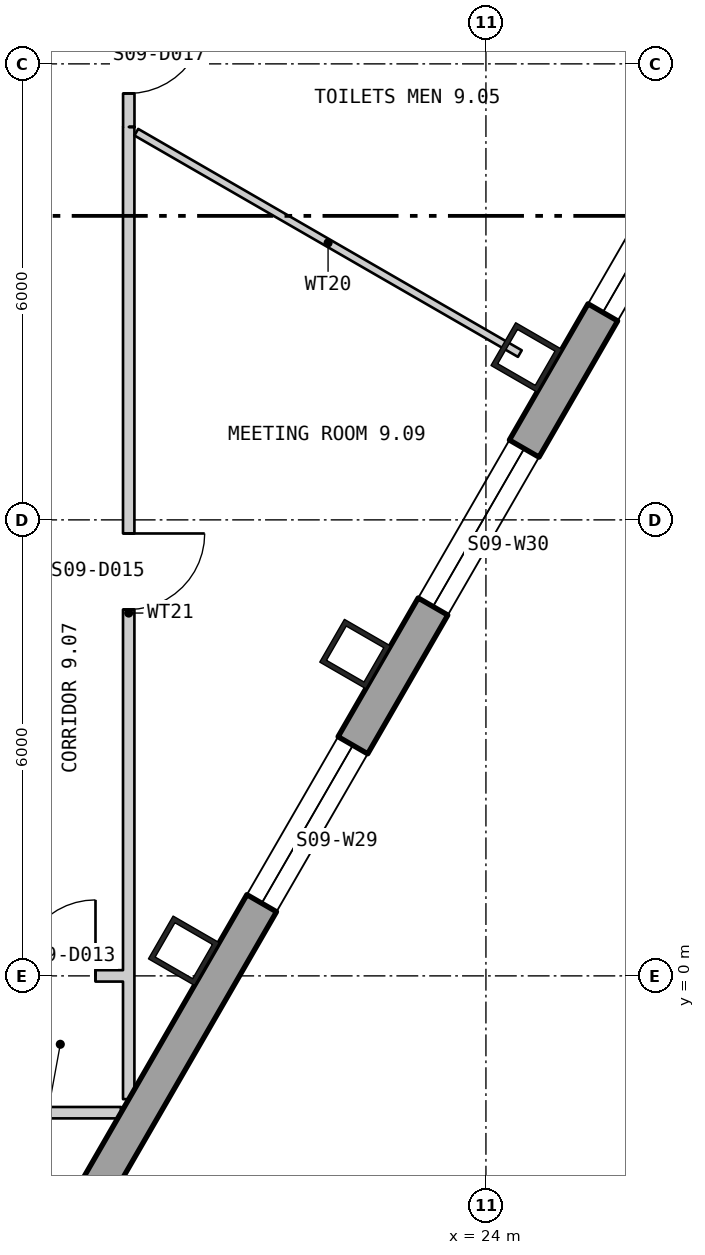
"""IFC4 building model, lengths in metres.
Left out: names, types, materials, properties, quantities, classifications, styles, units other than length and angle.
Written with IfcOpenShell. Run it as: python <this file> out.ifc"""

import sys

from ifc_helpers import new_model, si_unit, direction, frame, frame_2d, origin, origin_2d, place, context, subcontext, project, spatial, polyline, rectangle, hollow_rectangle, outline, extrude, element, fill, save


model = new_model("IFC4")
c1 = context("Model", 3, precision=1e-05, world=origin(), true_north=direction((0.0, 1.0)))
c2 = subcontext(c1, "Body", "Model", "MODEL_VIEW")
j1 = project(units=[si_unit("LENGTHUNIT", "METRE"), si_unit("PLANEANGLEUNIT", "RADIAN")], contexts=[c1])
p1 = place(None, origin())
s1 = spatial("IfcSite", under=j1, at=p1, CompositionType="ELEMENT")
p2 = place(p1, origin())
s2 = spatial("IfcBuilding", under=s1, at=p2, CompositionType="ELEMENT")
p3 = place(p2, frame((0.0, 0.0, 124.8)))
s3 = spatial("IfcBuildingStorey", under=s2, at=p3, CompositionType="ELEMENT", Elevation=124.8)
for number, where, z_axis, x_axis in (
    (1, (20.025, 0.331, 0.0), (0.0, 0.0, 1.0), (0.5, 0.866, 0.0)),
    (2, (22.279, 4.235, 0.0), (0.0, 0.0, 1.0), (0.5, 0.866, 0.0)),
    (3, (24.532, 8.138, 0.0), (0.0, 0.0, 1.0), (0.5, 0.866, 0.0)),
):
    element("IfcColumn", number, at=place(p3, frame(where, z_axis=z_axis, x_axis=x_axis)), inside=s3, PredefinedType="COLUMN", context=c2, shape_type="SweptSolid", body=[
        extrude(hollow_rectangle(XDim=0.65, YDim=0.7, WallThickness=0.065, at=origin_2d()), origin(), (0.0, 0.0, 1.0), 4.5),
    ])
p4 = place(p3, frame((4.58, -27.57, -0.18), z_axis=(0.0, 0.0, 1.0), x_axis=(0.500000711659, 0.866024992908, 0.0)))
e4 = element("IfcWall", 4, at=p4, inside=s3, PredefinedType="SOLIDWALL", context=c2, shape_type="SweptSolid", body=[
    extrude(outline(polyline([(-0.13, -0.225), (45.87, -0.225), (45.61, 0.225), (0.13, 0.225), (-0.13, -0.225)])), origin(), (0.0, 0.0, 1.0), 4.28),
])
p5 = place(p4, frame((1.424, 0.0, 1.08)))
e5 = element("IfcOpeningElement", 5, at=p5, cuts=e4, PredefinedType="OPENING", context=c2, shape_type="SweptSolid", body=[
    extrude(rectangle(XDim=2.4, YDim=2.6, at=frame_2d((1.2, 1.3))), frame((0.0, 0.235, 0.0), z_axis=(0.0, -1.0, 0.0), x_axis=(1.0, 0.0, 0.0)), (0.0, 0.0, 1.0), 0.47),
])
p6 = place(p4, frame((5.893, 0.0, 1.08)))
e6 = element("IfcOpeningElement", 6, at=p6, cuts=e4, PredefinedType="OPENING", context=c2, shape_type="SweptSolid", body=[
    extrude(rectangle(XDim=2.4, YDim=2.6, at=frame_2d((1.2, 1.3))), frame((0.0, 0.235, 0.0), z_axis=(0.0, -1.0, 0.0), x_axis=(1.0, 0.0, 0.0)), (0.0, 0.0, 1.0), 0.47),
])
p7 = place(p4, frame((10.401, 0.0, 1.08)))
e7 = element("IfcOpeningElement", 7, at=p7, cuts=e4, PredefinedType="OPENING", context=c2, shape_type="SweptSolid", body=[
    extrude(rectangle(XDim=2.4, YDim=2.6, at=frame_2d((1.2, 1.3))), frame((0.0, 0.235, 0.0), z_axis=(0.0, -1.0, 0.0), x_axis=(1.0, 0.0, 0.0)), (0.0, 0.0, 1.0), 0.47),
])
p8 = place(p4, frame((14.909, 0.0, 1.08)))
e8 = element("IfcOpeningElement", 8, at=p8, cuts=e4, PredefinedType="OPENING", context=c2, shape_type="SweptSolid", body=[
    extrude(rectangle(XDim=2.4, YDim=2.6, at=frame_2d((1.2, 1.3))), frame((0.0, 0.235, 0.0), z_axis=(0.0, -1.0, 0.0), x_axis=(1.0, 0.0, 0.0)), (0.0, 0.0, 1.0), 0.47),
])
p9 = place(p4, frame((19.416, 0.0, 1.08)))
e9 = element("IfcOpeningElement", 9, at=p9, cuts=e4, PredefinedType="OPENING", context=c2, shape_type="SweptSolid", body=[
    extrude(rectangle(XDim=2.4, YDim=2.6, at=frame_2d((1.2, 1.3))), frame((0.0, 0.235, 0.0), z_axis=(0.0, -1.0, 0.0), x_axis=(1.0, 0.0, 0.0)), (0.0, 0.0, 1.0), 0.47),
])
p10 = place(p4, frame((23.924, 0.0, 1.08)))
e10 = element("IfcOpeningElement", 10, at=p10, cuts=e4, PredefinedType="OPENING", context=c2, shape_type="SweptSolid", body=[
    extrude(rectangle(XDim=2.4, YDim=2.6, at=frame_2d((1.2, 1.3))), frame((0.0, 0.235, 0.0), z_axis=(0.0, -1.0, 0.0), x_axis=(1.0, 0.0, 0.0)), (0.0, 0.0, 1.0), 0.47),
])
p11 = place(p4, frame((32.939, 0.0, 1.08)))
e11 = element("IfcOpeningElement", 11, at=p11, cuts=e4, PredefinedType="OPENING", context=c2, shape_type="SweptSolid", body=[
    extrude(rectangle(XDim=2.4, YDim=2.6, at=frame_2d((1.2, 1.3))), frame((0.0, 0.235, 0.0), z_axis=(0.0, -1.0, 0.0), x_axis=(1.0, 0.0, 0.0)), (0.0, 0.0, 1.0), 0.47),
])
p12 = place(p4, frame((37.447, 0.0, 1.08)))
e12 = element("IfcOpeningElement", 12, at=p12, cuts=e4, PredefinedType="OPENING", context=c2, shape_type="SweptSolid", body=[
    extrude(rectangle(XDim=2.4, YDim=2.6, at=frame_2d((1.2, 1.3))), frame((0.0, 0.235, 0.0), z_axis=(0.0, -1.0, 0.0), x_axis=(1.0, 0.0, 0.0)), (0.0, 0.0, 1.0), 0.47),
])
p13 = place(p4, frame((41.916, 0.0, 1.08)))
e13 = element("IfcOpeningElement", 13, at=p13, cuts=e4, PredefinedType="OPENING", context=c2, shape_type="SweptSolid", body=[
    extrude(rectangle(XDim=2.4, YDim=2.6, at=frame_2d((1.2, 1.3))), frame((0.0, 0.235, 0.0), z_axis=(0.0, -1.0, 0.0), x_axis=(1.0, 0.0, 0.0)), (0.0, 0.0, 1.0), 0.47),
])
p14 = place(p3, frame((27.45, 12.042, -0.4), z_axis=(0.0, 0.0, 1.0), x_axis=(-0.499998388237, 0.866026334334, 0.0)))
e14 = element("IfcWall", 14, at=p14, inside=s3, PredefinedType="SOLIDWALL", context=c2, shape_type="SweptSolid", body=[
    extrude(outline(polyline([(-0.13, -0.225), (9.29, -0.225), (9.03, 0.225), (0.13, 0.225), (-0.13, -0.225)])), origin(), (0.0, 0.0, 1.0), 4.5),
])
p15 = place(p14, frame((1.594, 0.0, 1.3)))
e15 = element("IfcOpeningElement", 15, at=p15, cuts=e14, PredefinedType="OPENING", context=c2, shape_type="SweptSolid", body=[
    extrude(rectangle(XDim=1.8, YDim=2.6, at=frame_2d((0.9, 1.3))), frame((0.0, 0.235, 0.0), z_axis=(0.0, -1.0, 0.0), x_axis=(1.0, 0.0, 0.0)), (0.0, 0.0, 1.0), 0.47),
])
p16 = place(p3, frame((7.435, -1.8, 0.0), z_axis=(0.0, 0.0, 1.0), x_axis=(1.0, 0.0, 0.0)))
e16 = element("IfcWall", 16, at=p16, inside=s3, PredefinedType="PARTITIONING", context=c2, shape_type="SweptSolid", body=[
    extrude(rectangle(XDim=11.763, YDim=0.15, at=frame_2d((5.881, 0.0))), origin(), (0.0, 0.0, 1.0), 4.3),
])
p17 = place(p16, frame((8.877, 0.0, 0.0)))
e17 = element("IfcOpeningElement", 17, at=p17, cuts=e16, PredefinedType="OPENING", context=c2, shape_type="SweptSolid", body=[
    extrude(rectangle(XDim=1.0, YDim=2.1, at=frame_2d((0.5, 1.05))), frame((0.0, 0.085, 0.0), z_axis=(0.0, -1.0, 0.0), x_axis=(1.0, 0.0, 0.0)), (0.0, 0.0, 1.0), 0.17),
])
p18 = place(p3, frame((17.5, 0.0, 0.0), z_axis=(0.0, 0.0, 1.0), x_axis=(1.0, 0.0, 0.0)))
e18 = element("IfcWall", 18, at=p18, inside=s3, PredefinedType="PARTITIONING", context=c2, shape_type="SweptSolid", body=[
    extrude(rectangle(XDim=1.725, YDim=0.15, at=frame_2d((0.863, 0.0))), origin(), (0.0, 0.0, 1.0), 3.7),
])
p19 = place(p18, frame((0.363, 0.0, 0.0)))
e19 = element("IfcOpeningElement", 19, at=p19, cuts=e18, PredefinedType="OPENING", context=c2, shape_type="SweptSolid", body=[
    extrude(rectangle(XDim=1.0, YDim=2.1, at=frame_2d((0.5, 1.05))), frame((0.0, 0.085, 0.0), z_axis=(0.0, -1.0, 0.0), x_axis=(1.0, 0.0, 0.0)), (0.0, 0.0, 1.0), 0.17),
])
p20 = place(p3, frame((19.3, -1.622, 0.0), z_axis=(0.0, 0.0, 1.0), x_axis=(0.0, 1.0, 0.0)))
e20 = element("IfcWall", 20, at=p20, inside=s3, PredefinedType="PARTITIONING", context=c2, shape_type="SweptSolid", body=[
    extrude(rectangle(XDim=12.792, YDim=0.15, at=frame_2d((6.396, 0.0))), origin(), (0.0, 0.0, 1.0), 4.3),
])
p21 = place(p20, frame((6.443, 0.0, 0.0)))
e21 = element("IfcOpeningElement", 21, at=p21, cuts=e20, PredefinedType="OPENING", context=c2, shape_type="SweptSolid", body=[
    extrude(rectangle(XDim=1.0, YDim=2.1, at=frame_2d((0.5, 1.05))), frame((0.0, 0.085, 0.0), z_axis=(0.0, -1.0, 0.0), x_axis=(1.0, 0.0, 0.0)), (0.0, 0.0, 1.0), 0.17),
])
p22 = place(p3, frame((19.3, 13.052, 0.0), z_axis=(0.0, 0.0, 1.0), x_axis=(0.000531349553, -0.999999858834, 0.0)))
e22 = element("IfcWall", 22, at=p22, inside=s3, PredefinedType="PARTITIONING", context=c2, shape_type="SweptSolid", body=[
    extrude(rectangle(XDim=1.882, YDim=0.15, at=frame_2d((0.941, 0.0))), origin(), (0.0, 0.0, 1.0), 4.3),
])
p23 = place(p22, frame((0.441, 0.0, 0.0)))
e23 = element("IfcOpeningElement", 23, at=p23, cuts=e22, PredefinedType="OPENING", context=c2, shape_type="SweptSolid", body=[
    extrude(rectangle(XDim=1.0, YDim=2.1, at=frame_2d((0.5, 1.05))), frame((0.0, 0.085, 0.0), z_axis=(0.0, -1.0, 0.0), x_axis=(1.0, 0.0, 0.0)), (0.0, 0.0, 1.0), 0.17),
])
p24 = place(p3, frame((19.4, 11.101, 0.0), z_axis=(0.0, 0.0, 1.0), x_axis=(0.866048401274, -0.499960165064, 0.0)))
e24 = element("IfcWall", 24, at=p24, inside=s3, PredefinedType="PARTITIONING", context=c2, shape_type="SweptSolid", body=[
    extrude(rectangle(XDim=5.827, YDim=0.1, at=frame_2d((2.913, 0.0))), origin(), (0.0, 0.0, 1.0), 4.3),
])
p25 = place(p11, origin())
e25 = element("IfcWindow", 25, at=p25, inside=s3, PartitioningType="SINGLE_PANEL", PredefinedType="WINDOW", context=c2, shape_type="SweptSolid", body=[
    extrude(rectangle(XDim=2.4, YDim=2.6, at=frame_2d((1.2, 1.3))), frame((0.0, 0.105, 0.0), z_axis=(0.0, -1.0, 0.0), x_axis=(1.0, 0.0, 0.0)), (0.0, 0.0, 1.0), 0.06),
])
fill(e11, e25)
p26 = place(p12, origin())
e26 = element("IfcWindow", 26, at=p26, inside=s3, PartitioningType="SINGLE_PANEL", PredefinedType="WINDOW", context=c2, shape_type="SweptSolid", body=[
    extrude(rectangle(XDim=2.4, YDim=2.6, at=frame_2d((1.2, 1.3))), frame((0.0, 0.105, 0.0), z_axis=(0.0, -1.0, 0.0), x_axis=(1.0, 0.0, 0.0)), (0.0, 0.0, 1.0), 0.06),
])
fill(e12, e26)
p27 = place(p13, origin())
e27 = element("IfcWindow", 27, at=p27, inside=s3, PartitioningType="SINGLE_PANEL", PredefinedType="WINDOW", context=c2, shape_type="SweptSolid", body=[
    extrude(rectangle(XDim=2.4, YDim=2.6, at=frame_2d((1.2, 1.3))), frame((0.0, 0.105, 0.0), z_axis=(0.0, -1.0, 0.0), x_axis=(1.0, 0.0, 0.0)), (0.0, 0.0, 1.0), 0.06),
])
fill(e13, e27)
p28 = place(p19, origin())
e28 = element("IfcDoor", 28, at=p28, inside=s3, OperationType="SINGLE_SWING_LEFT", PredefinedType="DOOR", context=c2, shape_type="SweptSolid", body=[
    extrude(rectangle(XDim=1.0, YDim=2.1, at=frame_2d((0.5, 1.05))), frame((0.0, 0.025, 0.0), z_axis=(0.0, -1.0, 0.0), x_axis=(1.0, 0.0, 0.0)), (0.0, 0.0, 1.0), 0.05),
])
fill(e19, e28)
p29 = place(p21, origin())
e29 = element("IfcDoor", 29, at=p29, inside=s3, OperationType="SINGLE_SWING_RIGHT", PredefinedType="DOOR", context=c2, shape_type="SweptSolid", body=[
    extrude(rectangle(XDim=1.0, YDim=2.1, at=frame_2d((0.5, 1.05))), frame((0.0, 0.025, 0.0), z_axis=(0.0, -1.0, 0.0), x_axis=(1.0, 0.0, 0.0)), (0.0, 0.0, 1.0), 0.05),
])
fill(e21, e29)
p30 = place(p23, origin())
e30 = element("IfcDoor", 30, at=p30, inside=s3, OperationType="SINGLE_SWING_RIGHT", PredefinedType="DOOR", context=c2, shape_type="SweptSolid", body=[
    extrude(rectangle(XDim=1.0, YDim=2.1, at=frame_2d((0.5, 1.05))), frame((0.0, 0.025, 0.0), z_axis=(0.0, -1.0, 0.0), x_axis=(1.0, 0.0, 0.0)), (0.0, 0.0, 1.0), 0.05),
])
fill(e23, e30)
save(model, sys.argv[1])
